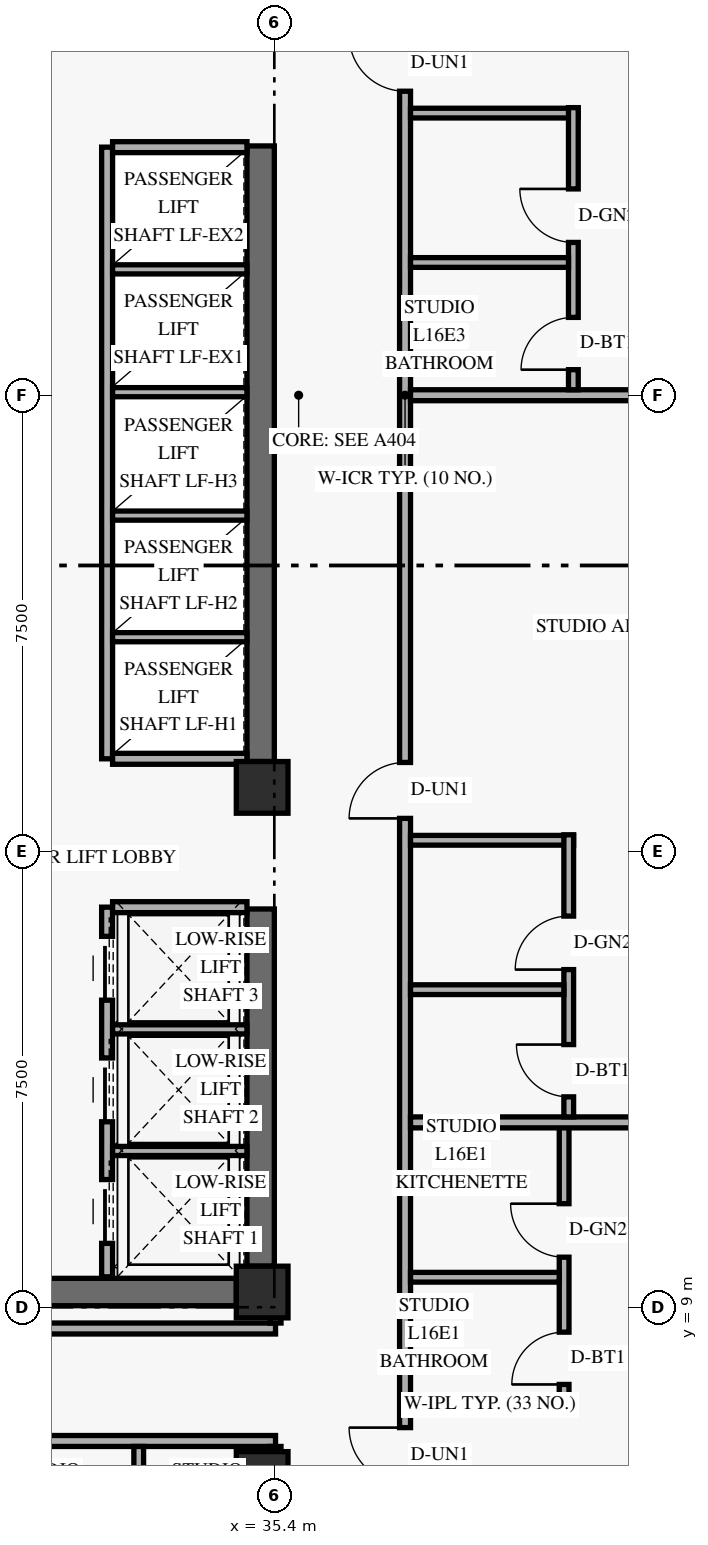
"""IFC4 building model, lengths in metres.
Left out: names, types, materials, properties, quantities, classifications, styles, units other than length and angle.
Written with IfcOpenShell. Run it as: python <this file> out.ifc"""

import sys

from ifc_helpers import new_model, si_unit, direction, frame, frame_2d, origin, origin_2d, place, context, subcontext, project, spatial, rectangle, extrude, element, fill, save


model = new_model("IFC4")
c1 = context("Model", 3, precision=1e-05, world=origin(), true_north=direction((0.0, 1.0)))
c2 = subcontext(c1, "Body", "Model", "MODEL_VIEW")
j1 = project(units=[si_unit("LENGTHUNIT", "METRE"), si_unit("PLANEANGLEUNIT", "RADIAN")], contexts=[c1])
p1 = place(None, origin())
s1 = spatial("IfcSite", under=j1, at=p1, CompositionType="ELEMENT")
p2 = place(p1, origin())
s2 = spatial("IfcBuilding", under=s1, at=p2, CompositionType="ELEMENT")
p3 = place(p2, frame((0.0, 0.0, 64.2)))
s3 = spatial("IfcBuildingStorey", under=s2, at=p3, CompositionType="ELEMENT", Elevation=64.2)
p4 = place(p3, frame((35.175, 9.675, 0.0), z_axis=(0.0, 0.0, 1.0), x_axis=(0.0, 1.0, 0.0)))
e1 = element("IfcWall", 1, at=p4, inside=s3, PredefinedType="SHEAR", context=c2, shape_type="SweptSolid", body=[
    extrude(rectangle(XDim=5.875, YDim=0.45, at=frame_2d((2.938, 0.0))), origin(), (0.0, 0.0, 1.0), 2.667),
])
p5 = place(p3, frame((35.175, 17.975, 0.0), z_axis=(0.0, 0.0, 1.0), x_axis=(0.0, 1.0, 0.0)))
e2 = element("IfcWall", 2, at=p5, inside=s3, PredefinedType="SHEAR", context=c2, shape_type="SweptSolid", body=[
    extrude(rectangle(XDim=10.125, YDim=0.45, at=frame_2d((5.062, 0.0))), origin(), (0.0, 0.0, 1.0), 2.667),
])
p6 = place(p3, frame((24.625, 9.25, 0.0), z_axis=(0.0, 0.0, 1.0), x_axis=(1.0, 0.0, 0.0)))
e3 = element("IfcWall", 3, at=p6, inside=s3, PredefinedType="SHEAR", context=c2, shape_type="SweptSolid", body=[
    extrude(rectangle(XDim=10.15, YDim=0.45, at=frame_2d((5.075, 0.0))), origin(), (0.0, 0.0, 1.0), 3.36),
])
for number, where, z_axis, x_axis in (
    (4, (35.2, 6.2, 0.0), (0.0, 0.0, 1.0), (1.0, 0.0, 0.0)),
    (5, (35.2, 9.25, 0.0), (0.0, 0.0, 1.0), (1.0, 0.0, 0.0)),
    (6, (35.2, 17.55, 0.0), (0.0, 0.0, 1.0), (1.0, 0.0, 0.0)),
):
    element("IfcColumn", number, at=place(p3, frame(where, z_axis=z_axis, x_axis=x_axis)), inside=s3, PredefinedType="COLUMN", context=c2, shape_type="SweptSolid", body=[
        extrude(rectangle(XDim=0.85, YDim=0.85, at=origin_2d()), origin(), (0.0, 0.0, 1.0), 3.6),
    ])
p7 = place(p3, frame((32.65, 9.5, 0.0), z_axis=(0.0, 0.0, 1.0), x_axis=(0.0, 1.0, 0.0)))
e7 = element("IfcWall", 7, at=p7, inside=s3, PredefinedType="STANDARD", context=c2, shape_type="SweptSolid", body=[
    extrude(rectangle(XDim=6.08, YDim=0.18, at=frame_2d((3.04, 0.0))), origin(), (0.0, 0.0, 1.0), 3.36),
])
p8 = place(p7, frame((0.55, 0.0, 0.0)))
e8 = element("IfcOpeningElement", 8, at=p8, cuts=e7, PredefinedType="OPENING", context=c2, shape_type="SweptSolid", body=[
    extrude(rectangle(XDim=1.05, YDim=2.2, at=frame_2d((0.525, 1.1))), frame((0.0, 0.1, 0.0), z_axis=(0.0, -1.0, 0.0), x_axis=(1.0, 0.0, 0.0)), (0.0, 0.0, 1.0), 0.2),
])
p9 = place(p7, frame((2.55, 0.0, 0.0)))
e9 = element("IfcOpeningElement", 9, at=p9, cuts=e7, PredefinedType="OPENING", context=c2, shape_type="SweptSolid", body=[
    extrude(rectangle(XDim=1.05, YDim=2.2, at=frame_2d((0.525, 1.1))), frame((0.0, 0.1, 0.0), z_axis=(0.0, -1.0, 0.0), x_axis=(1.0, 0.0, 0.0)), (0.0, 0.0, 1.0), 0.2),
])
p10 = place(p7, frame((4.55, 0.0, 0.0)))
e10 = element("IfcOpeningElement", 10, at=p10, cuts=e7, PredefinedType="OPENING", context=c2, shape_type="SweptSolid", body=[
    extrude(rectangle(XDim=1.05, YDim=2.2, at=frame_2d((0.525, 1.1))), frame((0.0, 0.1, 0.0), z_axis=(0.0, -1.0, 0.0), x_axis=(1.0, 0.0, 0.0)), (0.0, 0.0, 1.0), 0.2),
])
p11 = place(p3, frame((32.74, 15.58, 0.0), z_axis=(0.0, 0.0, 1.0), x_axis=(1.0, 0.0, 0.0)))
e11 = element("IfcWall", 11, at=p11, inside=s3, PredefinedType="STANDARD", context=c2, shape_type="SweptSolid", body=[
    extrude(rectangle(XDim=2.21, YDim=0.18, at=frame_2d((1.105, 0.0))), origin(), (0.0, 0.0, 1.0), 3.36),
])
for number, where, z_axis, x_axis in (
    (12, (32.74, 11.57, 0.0), (0.0, 0.0, 1.0), (1.0, 0.0, 0.0)),
    (13, (32.74, 13.57, 0.0), (0.0, 0.0, 1.0), (1.0, 0.0, 0.0)),
):
    element("IfcWall", number, at=place(p3, frame(where, z_axis=z_axis, x_axis=x_axis)), inside=s3, PredefinedType="STANDARD", context=c2, shape_type="SweptSolid", body=[
        extrude(rectangle(XDim=2.21, YDim=0.15, at=frame_2d((1.105, 0.0))), origin(), (0.0, 0.0, 1.0), 3.36),
    ])
p12 = place(p3, frame((32.65, 18.02, 0.0), z_axis=(0.0, 0.0, 1.0), x_axis=(0.0, 1.0, 0.0)))
e14 = element("IfcWall", 14, at=p12, inside=s3, PredefinedType="STANDARD", context=c2, shape_type="SweptSolid", body=[
    extrude(rectangle(XDim=10.06, YDim=0.18, at=frame_2d((5.03, 0.0))), origin(), (0.0, 0.0, 1.0), 3.36),
])
for number, where, z_axis, x_axis in (
    (15, (32.74, 18.02, 0.0), (0.0, 0.0, 1.0), (1.0, 0.0, 0.0)),
    (16, (32.74, 28.08, 0.0), (0.0, 0.0, 1.0), (1.0, 0.0, 0.0)),
):
    element("IfcWall", number, at=place(p3, frame(where, z_axis=z_axis, x_axis=x_axis)), inside=s3, PredefinedType="STANDARD", context=c2, shape_type="SweptSolid", body=[
        extrude(rectangle(XDim=2.21, YDim=0.18, at=frame_2d((1.105, 0.0))), origin(), (0.0, 0.0, 1.0), 3.36),
    ])
for number, where, z_axis, x_axis in (
    (17, (32.74, 20.02, 0.0), (0.0, 0.0, 1.0), (1.0, 0.0, 0.0)),
    (18, (32.74, 22.02, 0.0), (0.0, 0.0, 1.0), (1.0, 0.0, 0.0)),
    (19, (32.74, 24.05, 0.0), (0.0, 0.0, 1.0), (1.0, 0.0, 0.0)),
    (20, (32.74, 26.07, 0.0), (0.0, 0.0, 1.0), (1.0, 0.0, 0.0)),
):
    element("IfcWall", number, at=place(p3, frame(where, z_axis=z_axis, x_axis=x_axis)), inside=s3, PredefinedType="STANDARD", context=c2, shape_type="SweptSolid", body=[
        extrude(rectangle(XDim=2.21, YDim=0.15, at=frame_2d((1.105, 0.0))), origin(), (0.0, 0.0, 1.0), 3.36),
    ])
p13 = place(p3, frame((37.55, 1.29, 0.0), z_axis=(0.0, 0.0, 1.0), x_axis=(0.0, 1.0, 0.0)))
e21 = element("IfcWall", 21, at=p13, inside=s3, PredefinedType="STANDARD", context=c2, shape_type="SweptSolid", body=[
    extrude(rectangle(XDim=45.42, YDim=0.18, at=frame_2d((22.71, 0.0))), origin(), (0.0, 0.0, 1.0), 2.649),
])
p14 = place(p13, frame((4.81, 0.0, 0.0)))
e22 = element("IfcOpeningElement", 22, at=p14, cuts=e21, PredefinedType="OPENING", context=c2, shape_type="SweptSolid", body=[
    extrude(rectangle(XDim=0.92, YDim=2.15, at=frame_2d((0.46, 1.075))), frame((0.0, 0.1, 0.0), z_axis=(0.0, -1.0, 0.0), x_axis=(1.0, 0.0, 0.0)), (0.0, 0.0, 1.0), 0.2),
])
p15 = place(p13, frame((15.75, 0.0, 0.0)))
e23 = element("IfcOpeningElement", 23, at=p15, cuts=e21, PredefinedType="OPENING", context=c2, shape_type="SweptSolid", body=[
    extrude(rectangle(XDim=0.92, YDim=2.15, at=frame_2d((0.46, 1.075))), frame((0.0, 0.1, 0.0), z_axis=(0.0, -1.0, 0.0), x_axis=(1.0, 0.0, 0.0)), (0.0, 0.0, 1.0), 0.2),
])
p16 = place(p13, frame((27.71, 0.0, 0.0)))
e24 = element("IfcOpeningElement", 24, at=p16, cuts=e21, PredefinedType="OPENING", context=c2, shape_type="SweptSolid", body=[
    extrude(rectangle(XDim=0.92, YDim=2.15, at=frame_2d((0.46, 1.075))), frame((0.0, 0.1, 0.0), z_axis=(0.0, -1.0, 0.0), x_axis=(1.0, 0.0, 0.0)), (0.0, 0.0, 1.0), 0.2),
])
p17 = place(p13, frame((36.422, 0.0, 0.0)))
e25 = element("IfcOpeningElement", 25, at=p17, cuts=e21, PredefinedType="OPENING", context=c2, shape_type="SweptSolid", body=[
    extrude(rectangle(XDim=0.92, YDim=2.15, at=frame_2d((0.46, 1.075))), frame((0.0, 0.1, 0.0), z_axis=(0.0, -1.0, 0.0), x_axis=(1.0, 0.0, 0.0)), (0.0, 0.0, 1.0), 0.2),
])
p18 = place(p3, frame((14.1, 6.8, 0.0), z_axis=(0.0, 0.0, 1.0), x_axis=(1.0, 0.0, 0.0)))
e26 = element("IfcWall", 26, at=p18, inside=s3, PredefinedType="STANDARD", context=c2, shape_type="SweptSolid", body=[
    extrude(rectangle(XDim=21.32, YDim=0.18, at=frame_2d((10.66, 0.0))), origin(), (0.0, 0.0, 1.0), 2.649),
])
p19 = place(p18, frame((0.44, 0.0, 0.0)))
e27 = element("IfcOpeningElement", 27, at=p19, cuts=e26, PredefinedType="OPENING", context=c2, shape_type="SweptSolid", body=[
    extrude(rectangle(XDim=0.92, YDim=2.15, at=frame_2d((0.46, 1.075))), frame((0.0, 0.1, 0.0), z_axis=(0.0, -1.0, 0.0), x_axis=(1.0, 0.0, 0.0)), (0.0, 0.0, 1.0), 0.2),
])
p20 = place(p18, frame((8.582, 0.0, 0.0)))
e28 = element("IfcOpeningElement", 28, at=p20, cuts=e26, PredefinedType="OPENING", context=c2, shape_type="SweptSolid", body=[
    extrude(rectangle(XDim=0.95, YDim=2.15, at=frame_2d((0.475, 1.075))), frame((0.0, 0.1, 0.0), z_axis=(0.0, -1.0, 0.0), x_axis=(1.0, 0.0, 0.0)), (0.0, 0.0, 1.0), 0.2),
])
p21 = place(p18, frame((13.658, 0.0, 0.0)))
e29 = element("IfcOpeningElement", 29, at=p21, cuts=e26, PredefinedType="OPENING", context=c2, shape_type="SweptSolid", body=[
    extrude(rectangle(XDim=0.92, YDim=2.15, at=frame_2d((0.46, 1.075))), frame((0.0, 0.1, 0.0), z_axis=(0.0, -1.0, 0.0), x_axis=(1.0, 0.0, 0.0)), (0.0, 0.0, 1.0), 0.2),
])
p22 = place(p3, frame((23.75, 8.65, 0.0), z_axis=(0.0, 0.0, 1.0), x_axis=(1.0, 0.0, 0.0)))
e30 = element("IfcWall", 30, at=p22, inside=s3, PredefinedType="STANDARD", context=c2, shape_type="SweptSolid", body=[
    extrude(rectangle(XDim=11.67, YDim=0.18, at=frame_2d((5.835, 0.0))), origin(), (0.0, 0.0, 1.0), 2.649),
])
p23 = place(p3, frame((35.42, 1.29, 0.0), z_axis=(0.0, 0.0, 1.0), x_axis=(0.0, 1.0, 0.0)))
e31 = element("IfcWall", 31, at=p23, inside=s3, PredefinedType="PARTITIONING", context=c2, shape_type="SweptSolid", body=[
    extrude(rectangle(XDim=5.42, YDim=0.18, at=frame_2d((2.71, 0.0))), origin(), (0.0, 0.0, 1.0), 3.36),
])
p24 = place(p3, frame((35.42, 8.74, 0.0), z_axis=(0.0, 0.0, 1.0), x_axis=(0.0, 1.0, 0.0)))
e32 = element("IfcWall", 32, at=p24, inside=s3, PredefinedType="STANDARD", context=c2, shape_type="SweptSolid", body=[
    extrude(rectangle(XDim=0.51, YDim=0.18, at=frame_2d((0.255, 0.0))), origin(), (0.0, 0.0, 1.0), 3.36),
])
p25 = place(p3, frame((37.64, 7.4, 0.0), z_axis=(0.0, 0.0, 1.0), x_axis=(1.0, 0.0, 0.0)))
e33 = element("IfcWall", 33, at=p25, inside=s3, PredefinedType="PLUMBINGWALL", context=c2, shape_type="SweptSolid", body=[
    extrude(rectangle(XDim=2.606, YDim=0.16, at=frame_2d((1.303, 0.0))), origin(), (0.0, 0.0, 1.0), 3.36),
])
p26 = place(p3, frame((40.166, 7.31, 0.0), z_axis=(0.0, 0.0, 1.0), x_axis=(0.0, 1.0, 0.0)))
e34 = element("IfcWall", 34, at=p26, inside=s3, PredefinedType="PLUMBINGWALL", context=c2, shape_type="SweptSolid", body=[
    extrude(rectangle(XDim=4.73, YDim=0.16, at=frame_2d((2.365, 0.0))), origin(), (0.0, 0.0, 1.0), 2.649),
])
p27 = place(p26, frame((0.42, 0.0, 0.0)))
e35 = element("IfcOpeningElement", 35, at=p27, cuts=e34, PredefinedType="OPENING", context=c2, shape_type="SweptSolid", body=[
    extrude(rectangle(XDim=0.86, YDim=2.12, at=frame_2d((0.43, 1.06))), frame((0.0, 0.09, 0.0), z_axis=(0.0, -1.0, 0.0), x_axis=(1.0, 0.0, 0.0)), (0.0, 0.0, 1.0), 0.18),
])
p28 = place(p26, frame((2.513, 0.0, 0.0)))
e36 = element("IfcOpeningElement", 36, at=p28, cuts=e34, PredefinedType="OPENING", context=c2, shape_type="SweptSolid", body=[
    extrude(rectangle(XDim=0.88, YDim=2.12, at=frame_2d((0.44, 1.06))), frame((0.0, 0.09, 0.0), z_axis=(0.0, -1.0, 0.0), x_axis=(1.0, 0.0, 0.0)), (0.0, 0.0, 1.0), 0.18),
])
p29 = place(p3, frame((37.64, 9.493, 0.0), z_axis=(0.0, 0.0, 1.0), x_axis=(1.0, 0.0, 0.0)))
e37 = element("IfcWall", 37, at=p29, inside=s3, PredefinedType="PLUMBINGWALL", context=c2, shape_type="SweptSolid", body=[
    extrude(rectangle(XDim=2.446, YDim=0.16, at=frame_2d((1.223, 0.0))), origin(), (0.0, 0.0, 1.0), 3.36),
])
p30 = place(p3, frame((37.64, 12.04, 0.0), z_axis=(0.0, 0.0, 1.0), x_axis=(1.0, 0.0, 0.0)))
e38 = element("IfcWall", 38, at=p30, inside=s3, PredefinedType="PARTITIONING", context=c2, shape_type="SweptSolid", body=[
    extrude(rectangle(XDim=10.67, YDim=0.18, at=frame_2d((5.335, 0.0))), origin(), (0.0, 0.0, 1.0), 2.649),
])
p31 = place(p3, frame((37.64, 16.68, 0.0), z_axis=(0.0, 0.0, 1.0), x_axis=(1.0, 0.0, 0.0)))
e39 = element("IfcWall", 39, at=p31, inside=s3, PredefinedType="PLUMBINGWALL", context=c2, shape_type="SweptSolid", body=[
    extrude(rectangle(XDim=2.682, YDim=0.16, at=frame_2d((1.341, 0.0))), origin(), (0.0, 0.0, 1.0), 3.36),
])
p32 = place(p3, frame((40.242, 12.13, 0.0), z_axis=(0.0, 0.0, 1.0), x_axis=(0.0, 1.0, 0.0)))
e40 = element("IfcWall", 40, at=p32, inside=s3, PredefinedType="PLUMBINGWALL", context=c2, shape_type="SweptSolid", body=[
    extrude(rectangle(XDim=4.64, YDim=0.16, at=frame_2d((2.32, 0.0))), origin(), (0.0, 0.0, 1.0), 2.932),
])
p33 = place(p32, frame((0.33, 0.0, 0.0)))
e41 = element("IfcOpeningElement", 41, at=p33, cuts=e40, PredefinedType="OPENING", context=c2, shape_type="SweptSolid", body=[
    extrude(rectangle(XDim=0.86, YDim=2.12, at=frame_2d((0.43, 1.06))), frame((0.0, 0.09, 0.0), z_axis=(0.0, -1.0, 0.0), x_axis=(1.0, 0.0, 0.0)), (0.0, 0.0, 1.0), 0.18),
])
p34 = place(p32, frame((2.423, 0.0, 0.0)))
e42 = element("IfcOpeningElement", 42, at=p34, cuts=e40, PredefinedType="OPENING", context=c2, shape_type="SweptSolid", body=[
    extrude(rectangle(XDim=0.88, YDim=2.12, at=frame_2d((0.44, 1.06))), frame((0.0, 0.09, 0.0), z_axis=(0.0, -1.0, 0.0), x_axis=(1.0, 0.0, 0.0)), (0.0, 0.0, 1.0), 0.18),
])
p35 = place(p3, frame((37.64, 14.223, 0.0), z_axis=(0.0, 0.0, 1.0), x_axis=(1.0, 0.0, 0.0)))
e43 = element("IfcWall", 43, at=p35, inside=s3, PredefinedType="PLUMBINGWALL", context=c2, shape_type="SweptSolid", body=[
    extrude(rectangle(XDim=2.522, YDim=0.16, at=frame_2d((1.261, 0.0))), origin(), (0.0, 0.0, 1.0), 3.36),
])
p36 = place(p3, frame((37.64, 24.0, 0.0), z_axis=(0.0, 0.0, 1.0), x_axis=(1.0, 0.0, 0.0)))
e44 = element("IfcWall", 44, at=p36, inside=s3, PredefinedType="PARTITIONING", context=c2, shape_type="SweptSolid", body=[
    extrude(rectangle(XDim=10.67, YDim=0.18, at=frame_2d((5.335, 0.0))), origin(), (0.0, 0.0, 1.0), 2.649),
])
p37 = place(p3, frame((37.64, 28.64, 0.0), z_axis=(0.0, 0.0, 1.0), x_axis=(1.0, 0.0, 0.0)))
e45 = element("IfcWall", 45, at=p37, inside=s3, PredefinedType="PLUMBINGWALL", context=c2, shape_type="SweptSolid", body=[
    extrude(rectangle(XDim=2.758, YDim=0.16, at=frame_2d((1.379, 0.0))), origin(), (0.0, 0.0, 1.0), 3.36),
])
p38 = place(p3, frame((40.318, 24.09, 0.0), z_axis=(0.0, 0.0, 1.0), x_axis=(0.0, 1.0, 0.0)))
e46 = element("IfcWall", 46, at=p38, inside=s3, PredefinedType="PLUMBINGWALL", context=c2, shape_type="SweptSolid", body=[
    extrude(rectangle(XDim=4.64, YDim=0.16, at=frame_2d((2.32, 0.0))), origin(), (0.0, 0.0, 1.0), 2.932),
])
p39 = place(p38, frame((0.33, 0.0, 0.0)))
e47 = element("IfcOpeningElement", 47, at=p39, cuts=e46, PredefinedType="OPENING", context=c2, shape_type="SweptSolid", body=[
    extrude(rectangle(XDim=0.86, YDim=2.12, at=frame_2d((0.43, 1.06))), frame((0.0, 0.09, 0.0), z_axis=(0.0, -1.0, 0.0), x_axis=(1.0, 0.0, 0.0)), (0.0, 0.0, 1.0), 0.18),
])
p40 = place(p38, frame((2.423, 0.0, 0.0)))
e48 = element("IfcOpeningElement", 48, at=p40, cuts=e46, PredefinedType="OPENING", context=c2, shape_type="SweptSolid", body=[
    extrude(rectangle(XDim=0.88, YDim=2.12, at=frame_2d((0.44, 1.06))), frame((0.0, 0.09, 0.0), z_axis=(0.0, -1.0, 0.0), x_axis=(1.0, 0.0, 0.0)), (0.0, 0.0, 1.0), 0.18),
])
p41 = place(p3, frame((37.64, 26.183, 0.0), z_axis=(0.0, 0.0, 1.0), x_axis=(1.0, 0.0, 0.0)))
e49 = element("IfcWall", 49, at=p41, inside=s3, PredefinedType="PLUMBINGWALL", context=c2, shape_type="SweptSolid", body=[
    extrude(rectangle(XDim=2.598, YDim=0.16, at=frame_2d((1.299, 0.0))), origin(), (0.0, 0.0, 1.0), 3.36),
])
p42 = place(p3, frame((33.17, 4.11, 0.0), z_axis=(0.0, 0.0, 1.0), x_axis=(0.0, 1.0, 0.0)))
e50 = element("IfcWall", 50, at=p42, inside=s3, PredefinedType="PLUMBINGWALL", context=c2, shape_type="SweptSolid", body=[
    extrude(rectangle(XDim=2.6, YDim=0.16, at=frame_2d((1.3, 0.0))), origin(), (0.0, 0.0, 1.0), 2.809),
])
p43 = place(p8, origin())
e51 = element("IfcDoor", 51, at=p43, inside=s3, OperationType="SLIDING_TO_LEFT", PredefinedType="DOOR", context=c2, shape_type="SweptSolid", body=[
    extrude(rectangle(XDim=1.05, YDim=2.2, at=frame_2d((0.525, 1.1))), frame((0.0, 0.025, 0.0), z_axis=(0.0, -1.0, 0.0), x_axis=(1.0, 0.0, 0.0)), (0.0, 0.0, 1.0), 0.05),
])
fill(e8, e51)
p44 = place(p9, origin())
e52 = element("IfcDoor", 52, at=p44, inside=s3, OperationType="SLIDING_TO_LEFT", PredefinedType="DOOR", context=c2, shape_type="SweptSolid", body=[
    extrude(rectangle(XDim=1.05, YDim=2.2, at=frame_2d((0.525, 1.1))), frame((0.0, 0.025, 0.0), z_axis=(0.0, -1.0, 0.0), x_axis=(1.0, 0.0, 0.0)), (0.0, 0.0, 1.0), 0.05),
])
fill(e9, e52)
p45 = place(p10, origin())
e53 = element("IfcDoor", 53, at=p45, inside=s3, OperationType="SLIDING_TO_LEFT", PredefinedType="DOOR", context=c2, shape_type="SweptSolid", body=[
    extrude(rectangle(XDim=1.05, YDim=2.2, at=frame_2d((0.525, 1.1))), frame((0.0, 0.025, 0.0), z_axis=(0.0, -1.0, 0.0), x_axis=(1.0, 0.0, 0.0)), (0.0, 0.0, 1.0), 0.05),
])
fill(e10, e53)
p46 = place(p14, origin())
e54 = element("IfcDoor", 54, at=p46, inside=s3, OperationType="SINGLE_SWING_RIGHT", PredefinedType="DOOR", context=c2, shape_type="SweptSolid", body=[
    extrude(rectangle(XDim=0.92, YDim=2.15, at=frame_2d((0.46, 1.075))), frame((0.0, 0.025, 0.0), z_axis=(0.0, -1.0, 0.0), x_axis=(1.0, 0.0, 0.0)), (0.0, 0.0, 1.0), 0.05),
])
fill(e22, e54)
p47 = place(p27, origin())
e55 = element("IfcDoor", 55, at=p47, inside=s3, OperationType="SINGLE_SWING_LEFT", PredefinedType="DOOR", context=c2, shape_type="SweptSolid", body=[
    extrude(rectangle(XDim=0.86, YDim=2.12, at=frame_2d((0.43, 1.06))), frame((0.0, 0.025, 0.0), z_axis=(0.0, -1.0, 0.0), x_axis=(1.0, 0.0, 0.0)), (0.0, 0.0, 1.0), 0.05),
])
fill(e35, e55)
p48 = place(p28, origin())
e56 = element("IfcDoor", 56, at=p48, inside=s3, OperationType="SINGLE_SWING_RIGHT", PredefinedType="DOOR", context=c2, shape_type="SweptSolid", body=[
    extrude(rectangle(XDim=0.88, YDim=2.12, at=frame_2d((0.44, 1.06))), frame((0.0, 0.025, 0.0), z_axis=(0.0, -1.0, 0.0), x_axis=(1.0, 0.0, 0.0)), (0.0, 0.0, 1.0), 0.05),
])
fill(e36, e56)
p49 = place(p15, origin())
e57 = element("IfcDoor", 57, at=p49, inside=s3, OperationType="SINGLE_SWING_LEFT", PredefinedType="DOOR", context=c2, shape_type="SweptSolid", body=[
    extrude(rectangle(XDim=0.92, YDim=2.15, at=frame_2d((0.46, 1.075))), frame((0.0, 0.025, 0.0), z_axis=(0.0, -1.0, 0.0), x_axis=(1.0, 0.0, 0.0)), (0.0, 0.0, 1.0), 0.05),
])
fill(e23, e57)
p50 = place(p33, origin())
e58 = element("IfcDoor", 58, at=p50, inside=s3, OperationType="SINGLE_SWING_RIGHT", PredefinedType="DOOR", context=c2, shape_type="SweptSolid", body=[
    extrude(rectangle(XDim=0.86, YDim=2.12, at=frame_2d((0.43, 1.06))), frame((0.0, 0.025, 0.0), z_axis=(0.0, -1.0, 0.0), x_axis=(1.0, 0.0, 0.0)), (0.0, 0.0, 1.0), 0.05),
])
fill(e41, e58)
p51 = place(p34, origin())
e59 = element("IfcDoor", 59, at=p51, inside=s3, OperationType="SINGLE_SWING_LEFT", PredefinedType="DOOR", context=c2, shape_type="SweptSolid", body=[
    extrude(rectangle(XDim=0.88, YDim=2.12, at=frame_2d((0.44, 1.06))), frame((0.0, 0.025, 0.0), z_axis=(0.0, -1.0, 0.0), x_axis=(1.0, 0.0, 0.0)), (0.0, 0.0, 1.0), 0.05),
])
fill(e42, e59)
p52 = place(p16, origin())
e60 = element("IfcDoor", 60, at=p52, inside=s3, OperationType="SINGLE_SWING_RIGHT", PredefinedType="DOOR", context=c2, shape_type="SweptSolid", body=[
    extrude(rectangle(XDim=0.92, YDim=2.15, at=frame_2d((0.46, 1.075))), frame((0.0, 0.025, 0.0), z_axis=(0.0, -1.0, 0.0), x_axis=(1.0, 0.0, 0.0)), (0.0, 0.0, 1.0), 0.05),
])
fill(e24, e60)
p53 = place(p39, origin())
e61 = element("IfcDoor", 61, at=p53, inside=s3, OperationType="SINGLE_SWING_LEFT", PredefinedType="DOOR", context=c2, shape_type="SweptSolid", body=[
    extrude(rectangle(XDim=0.86, YDim=2.12, at=frame_2d((0.43, 1.06))), frame((0.0, 0.025, 0.0), z_axis=(0.0, -1.0, 0.0), x_axis=(1.0, 0.0, 0.0)), (0.0, 0.0, 1.0), 0.05),
])
fill(e47, e61)
p54 = place(p40, origin())
e62 = element("IfcDoor", 62, at=p54, inside=s3, OperationType="SINGLE_SWING_RIGHT", PredefinedType="DOOR", context=c2, shape_type="SweptSolid", body=[
    extrude(rectangle(XDim=0.88, YDim=2.12, at=frame_2d((0.44, 1.06))), frame((0.0, 0.025, 0.0), z_axis=(0.0, -1.0, 0.0), x_axis=(1.0, 0.0, 0.0)), (0.0, 0.0, 1.0), 0.05),
])
fill(e48, e62)
save(model, sys.argv[1])
